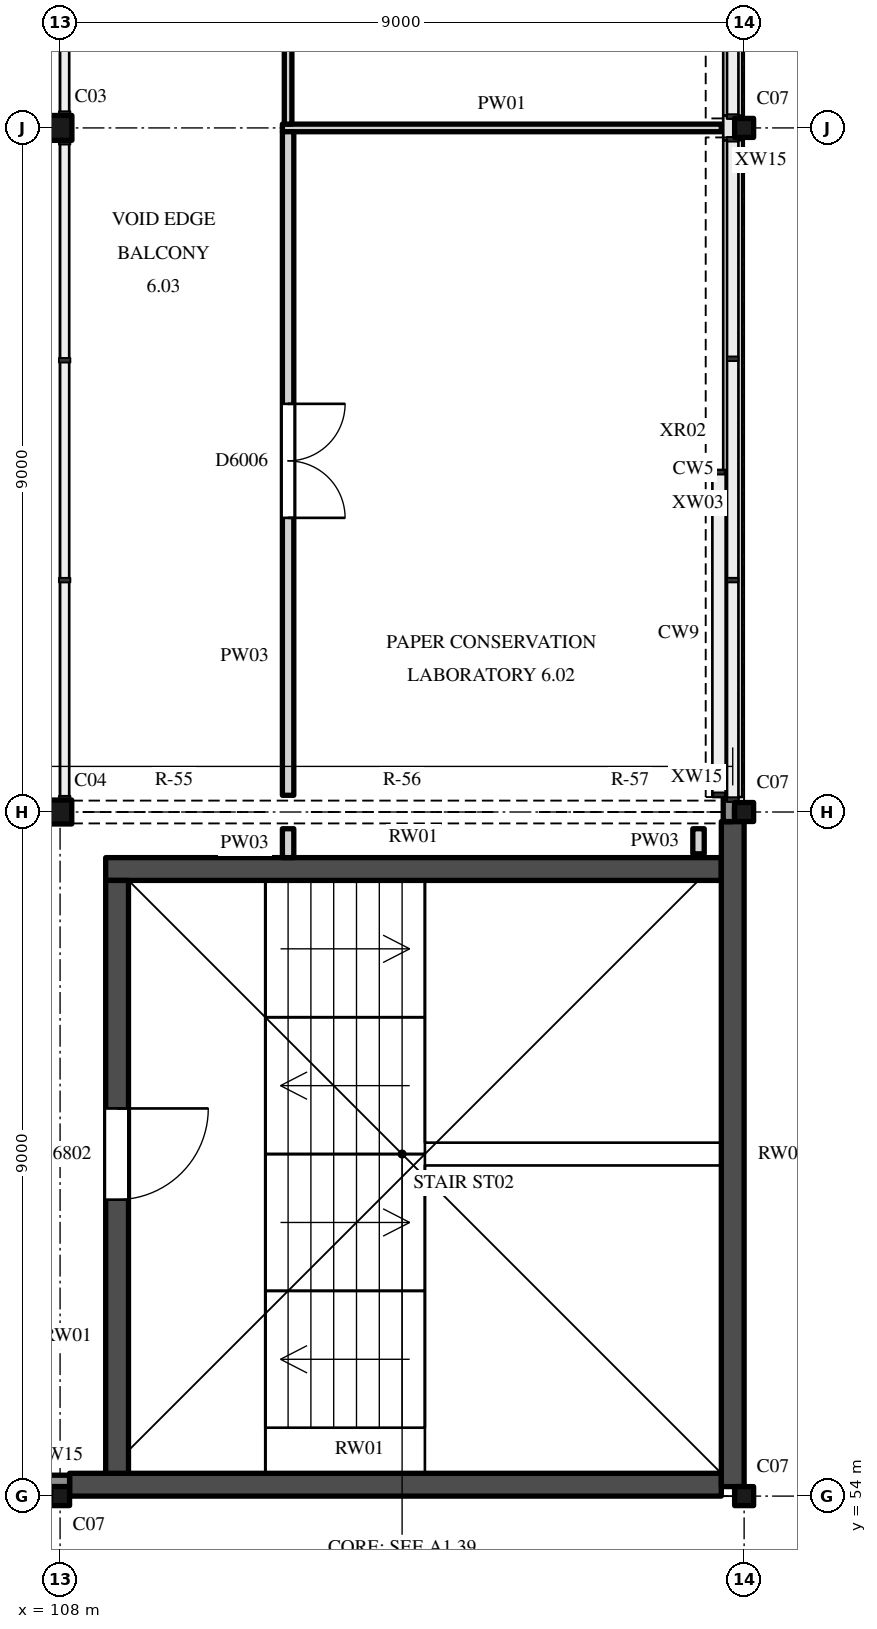
"""IFC4 building model, lengths in metres.
Left out: names, types, materials, properties, quantities, classifications, styles, units other than length and angle.
Written with IfcOpenShell. Run it as: python <this file> out.ifc"""

import sys

from ifc_helpers import new_model, si_unit, direction, frame, frame_2d, origin, origin_2d, place, context, subcontext, project, spatial, polyline, rectangle, hollow_rectangle, i_section, outline, extrude, element, fill, save


model = new_model("IFC4")
c1 = context("Model", 3, precision=1e-05, world=origin(), true_north=direction((0.0, 1.0)))
c2 = subcontext(c1, "Body", "Model", "MODEL_VIEW")
j1 = project(units=[si_unit("LENGTHUNIT", "METRE"), si_unit("PLANEANGLEUNIT", "RADIAN")], contexts=[c1])
p1 = place(None, origin())
s1 = spatial("IfcSite", under=j1, at=p1, CompositionType="ELEMENT")
p2 = place(p1, origin())
s2 = spatial("IfcBuilding", under=s1, at=p2, CompositionType="ELEMENT")
p3 = place(p2, frame((0.0, 0.0, 36.0)))
s3 = spatial("IfcBuildingStorey", under=s2, at=p3, CompositionType="ELEMENT", Elevation=36.0)
for number, where, z_axis, x_axis in (
    (1, (108.0, 54.0, 0.0), (0.0, 0.0, 1.0), (1.0, 0.0, 0.0)),
    (2, (117.0, 54.0, 0.0), (0.0, 0.0, 1.0), (1.0, 0.0, 0.0)),
):
    element("IfcColumn", number, at=place(p3, frame(where, z_axis=z_axis, x_axis=x_axis)), inside=s3, PredefinedType="COLUMN", context=c2, shape_type="SweptSolid", body=[
        extrude(hollow_rectangle(XDim=0.25, YDim=0.25, WallThickness=0.009, InnerFilletRadius=0.013, OuterFilletRadius=0.022, at=origin_2d()), origin(), (0.0, 0.0, 1.0), 8.0),
    ])
p4 = place(p3, frame((108.0, 63.0, 0.0), z_axis=(0.0, 0.0, 1.0), x_axis=(1.0, 0.0, 0.0)))
e3 = element("IfcColumn", 3, at=p4, inside=s3, PredefinedType="COLUMN", context=c2, shape_type="SweptSolid", body=[
    extrude(i_section(OverallWidth=0.307, OverallDepth=0.315, WebThickness=0.012, FlangeThickness=0.019, FilletRadius=0.017, at=origin_2d()), origin(), (0.0, 0.0, 1.0), 8.0),
])
p5 = place(p3, frame((117.0, 63.0, 0.0), z_axis=(0.0, 0.0, 1.0), x_axis=(1.0, 0.0, 0.0)))
e4 = element("IfcColumn", 4, at=p5, inside=s3, PredefinedType="COLUMN", context=c2, shape_type="SweptSolid", body=[
    extrude(hollow_rectangle(XDim=0.25, YDim=0.25, WallThickness=0.009, InnerFilletRadius=0.013, OuterFilletRadius=0.022, at=origin_2d()), origin(), (0.0, 0.0, 1.0), 8.0),
])
p6 = place(p3, frame((108.0, 72.0, 0.0), z_axis=(0.0, 0.0, 1.0), x_axis=(1.0, 0.0, 0.0)))
e5 = element("IfcColumn", 5, at=p6, inside=s3, PredefinedType="COLUMN", context=c2, shape_type="SweptSolid", body=[
    extrude(i_section(OverallWidth=0.311, OverallDepth=0.327, WebThickness=0.016, FlangeThickness=0.025, FilletRadius=0.017, at=origin_2d()), origin(), (0.0, 0.0, 1.0), 8.0),
])
p7 = place(p3, frame((117.0, 72.0, 0.0), z_axis=(0.0, 0.0, 1.0), x_axis=(1.0, 0.0, 0.0)))
e6 = element("IfcColumn", 6, at=p7, inside=s3, PredefinedType="COLUMN", context=c2, shape_type="SweptSolid", body=[
    extrude(hollow_rectangle(XDim=0.25, YDim=0.25, WallThickness=0.009, InnerFilletRadius=0.013, OuterFilletRadius=0.022, at=origin_2d()), origin(), (0.0, 0.0, 1.0), 8.0),
])
p8 = place(p3, frame((108.125, 54.15, 0.0), z_axis=(0.0, 0.0, 1.0), x_axis=(1.0, 0.0, 0.0)))
e7 = element("IfcWall", 7, at=p8, inside=s3, PredefinedType="SHEAR", context=c2, shape_type="SweptSolid", body=[
    extrude(rectangle(XDim=8.575, YDim=0.3, at=frame_2d((4.288, 0.0))), origin(), (0.0, 0.0, 1.0), 7.864),
])
p9 = place(p3, frame((108.6, 62.25, 0.0), z_axis=(0.0, 0.0, 1.0), x_axis=(1.0, 0.0, 0.0)))
e8 = element("IfcWall", 8, at=p9, inside=s3, PredefinedType="SHEAR", context=c2, shape_type="SweptSolid", body=[
    extrude(rectangle(XDim=8.1, YDim=0.3, at=frame_2d((4.05, 0.0))), origin(), (0.0, 0.0, 1.0), 14.344),
])
p10 = place(p3, frame((108.75, 54.3, 0.0), z_axis=(0.0, 0.0, 1.0), x_axis=(0.0, 1.0, 0.0)))
e9 = element("IfcWall", 9, at=p10, inside=s3, PredefinedType="SHEAR", context=c2, shape_type="SweptSolid", body=[
    extrude(outline(polyline([(0.0, 0.0), (7.8, 0.0), (7.8, 14.224), (0.0, 7.984), (0.0, 0.0)])), frame((0.0, 0.15, 0.0), z_axis=(0.0, -1.0, 0.0), x_axis=(1.0, 0.0, 0.0)), (0.0, 0.0, 1.0), 0.3),
])
p11 = place(p10, frame((3.6, 0.0, 0.0)))
e10 = element("IfcOpeningElement", 10, at=p11, cuts=e9, PredefinedType="OPENING", context=c2, shape_type="SweptSolid", body=[
    extrude(rectangle(XDim=1.2, YDim=2.1, at=frame_2d((0.6, 1.05))), frame((0.0, 0.16, 0.0), z_axis=(0.0, -1.0, 0.0), x_axis=(1.0, 0.0, 0.0)), (0.0, 0.0, 1.0), 0.32),
])
p12 = place(p3, frame((116.85, 54.125, 0.0), z_axis=(0.0, 0.0, 1.0), x_axis=(0.0, 1.0, 0.0)))
e11 = element("IfcWall", 11, at=p12, inside=s3, PredefinedType="SHEAR", context=c2, shape_type="SweptSolid", body=[
    extrude(outline(polyline([(0.0, 0.0), (8.75, 0.0), (8.75, 14.844), (0.0, 7.844), (0.0, 0.0)])), frame((0.0, 0.15, 0.0), z_axis=(0.0, -1.0, 0.0), x_axis=(1.0, 0.0, 0.0)), (0.0, 0.0, 1.0), 0.3),
])
for number, where, z_axis, x_axis in (
    (12, (116.85, 63.197, 0.0), (0.0, 0.0, 1.0), (0.0, 1.0, 0.0)),
    (13, (116.85, 72.161, 0.0), (0.0, 0.0, 1.0), (0.0, 1.0, 0.0)),
):
    element("IfcWall", number, at=place(p3, frame(where, z_axis=z_axis, x_axis=x_axis)), inside=s3, PredefinedType="SOLIDWALL", context=c2, shape_type="SweptSolid", body=[
        extrude(rectangle(XDim=8.642, YDim=0.25, at=frame_2d((4.321, 0.0))), origin(), (0.0, 0.0, 1.0), 1.1),
    ])
p13 = place(p3, frame((107.803, 54.2, 0.0), z_axis=(0.0, 0.0, 1.0), x_axis=(1.0, 0.0, 0.0)))
e14 = element("IfcWall", 14, at=p13, inside=s3, PredefinedType="SOLIDWALL", context=c2, shape_type="SweptSolid", body=[
    extrude(rectangle(XDim=0.322, YDim=0.15, at=frame_2d((0.161, 0.0))), origin(), (0.0, 0.0, 1.0), 7.864),
])
p14 = place(p3, frame((116.8, 62.875, 0.0), z_axis=(0.0, 0.0, 1.0), x_axis=(0.0, 1.0, 0.0)))
e15 = element("IfcWall", 15, at=p14, inside=s3, PredefinedType="SOLIDWALL", context=c2, shape_type="SweptSolid", body=[
    extrude(rectangle(XDim=0.322, YDim=0.15, at=frame_2d((0.161, 0.0))), origin(), (0.0, 0.0, 1.0), 14.844),
])
p15 = place(p3, frame((116.8, 71.839, 0.0), z_axis=(0.0, 0.0, 1.0), x_axis=(0.0, 1.0, 0.0)))
e16 = element("IfcWall", 16, at=p15, inside=s3, PredefinedType="SOLIDWALL", context=c2, shape_type="SweptSolid", body=[
    extrude(rectangle(XDim=0.322, YDim=0.15, at=frame_2d((0.161, 0.0))), origin(), (0.0, 0.0, 1.0), 1.1),
])
p16 = place(p3, frame((54.15, 63.0, 15.2), z_axis=(0.0, 0.0, 1.0), x_axis=(1.0, 0.0, 0.0)))
e17 = element("IfcWall", 17, at=p16, inside=s3, PredefinedType="SOLIDWALL", context=c2, shape_type="SweptSolid", body=[
    extrude(rectangle(XDim=62.7, YDim=0.3, at=frame_2d((31.35, 0.0))), origin(), (0.0, 0.0, 1.0), 0.9),
])
p17 = place(p16, frame((0.15, 0.0, 0.15)))
e18 = element("IfcOpeningElement", 18, at=p17, cuts=e17, PredefinedType="OPENING", context=c2, shape_type="SweptSolid", body=[
    extrude(rectangle(XDim=2.4, YDim=0.6, at=frame_2d((1.2, 0.3))), frame((0.0, 0.16, 0.0), z_axis=(0.0, -1.0, 0.0), x_axis=(1.0, 0.0, 0.0)), (0.0, 0.0, 1.0), 0.32),
])
p18 = place(p16, frame((3.15, 0.0, 0.15)))
e19 = element("IfcOpeningElement", 19, at=p18, cuts=e17, PredefinedType="OPENING", context=c2, shape_type="SweptSolid", body=[
    extrude(rectangle(XDim=2.4, YDim=0.6, at=frame_2d((1.2, 0.3))), frame((0.0, 0.16, 0.0), z_axis=(0.0, -1.0, 0.0), x_axis=(1.0, 0.0, 0.0)), (0.0, 0.0, 1.0), 0.32),
])
p19 = place(p16, frame((6.15, 0.0, 0.15)))
e20 = element("IfcOpeningElement", 20, at=p19, cuts=e17, PredefinedType="OPENING", context=c2, shape_type="SweptSolid", body=[
    extrude(rectangle(XDim=2.4, YDim=0.6, at=frame_2d((1.2, 0.3))), frame((0.0, 0.16, 0.0), z_axis=(0.0, -1.0, 0.0), x_axis=(1.0, 0.0, 0.0)), (0.0, 0.0, 1.0), 0.32),
])
p20 = place(p16, frame((9.15, 0.0, 0.15)))
e21 = element("IfcOpeningElement", 21, at=p20, cuts=e17, PredefinedType="OPENING", context=c2, shape_type="SweptSolid", body=[
    extrude(rectangle(XDim=2.4, YDim=0.6, at=frame_2d((1.2, 0.3))), frame((0.0, 0.16, 0.0), z_axis=(0.0, -1.0, 0.0), x_axis=(1.0, 0.0, 0.0)), (0.0, 0.0, 1.0), 0.32),
])
p21 = place(p16, frame((12.15, 0.0, 0.15)))
e22 = element("IfcOpeningElement", 22, at=p21, cuts=e17, PredefinedType="OPENING", context=c2, shape_type="SweptSolid", body=[
    extrude(rectangle(XDim=2.4, YDim=0.6, at=frame_2d((1.2, 0.3))), frame((0.0, 0.16, 0.0), z_axis=(0.0, -1.0, 0.0), x_axis=(1.0, 0.0, 0.0)), (0.0, 0.0, 1.0), 0.32),
])
p22 = place(p16, frame((15.15, 0.0, 0.15)))
e23 = element("IfcOpeningElement", 23, at=p22, cuts=e17, PredefinedType="OPENING", context=c2, shape_type="SweptSolid", body=[
    extrude(rectangle(XDim=2.4, YDim=0.6, at=frame_2d((1.2, 0.3))), frame((0.0, 0.16, 0.0), z_axis=(0.0, -1.0, 0.0), x_axis=(1.0, 0.0, 0.0)), (0.0, 0.0, 1.0), 0.32),
])
p23 = place(p16, frame((18.15, 0.0, 0.15)))
e24 = element("IfcOpeningElement", 24, at=p23, cuts=e17, PredefinedType="OPENING", context=c2, shape_type="SweptSolid", body=[
    extrude(rectangle(XDim=2.4, YDim=0.6, at=frame_2d((1.2, 0.3))), frame((0.0, 0.16, 0.0), z_axis=(0.0, -1.0, 0.0), x_axis=(1.0, 0.0, 0.0)), (0.0, 0.0, 1.0), 0.32),
])
p24 = place(p16, frame((21.15, 0.0, 0.15)))
e25 = element("IfcOpeningElement", 25, at=p24, cuts=e17, PredefinedType="OPENING", context=c2, shape_type="SweptSolid", body=[
    extrude(rectangle(XDim=2.4, YDim=0.6, at=frame_2d((1.2, 0.3))), frame((0.0, 0.16, 0.0), z_axis=(0.0, -1.0, 0.0), x_axis=(1.0, 0.0, 0.0)), (0.0, 0.0, 1.0), 0.32),
])
p25 = place(p16, frame((24.15, 0.0, 0.15)))
e26 = element("IfcOpeningElement", 26, at=p25, cuts=e17, PredefinedType="OPENING", context=c2, shape_type="SweptSolid", body=[
    extrude(rectangle(XDim=2.4, YDim=0.6, at=frame_2d((1.2, 0.3))), frame((0.0, 0.16, 0.0), z_axis=(0.0, -1.0, 0.0), x_axis=(1.0, 0.0, 0.0)), (0.0, 0.0, 1.0), 0.32),
])
p26 = place(p16, frame((27.15, 0.0, 0.15)))
e27 = element("IfcOpeningElement", 27, at=p26, cuts=e17, PredefinedType="OPENING", context=c2, shape_type="SweptSolid", body=[
    extrude(rectangle(XDim=2.4, YDim=0.6, at=frame_2d((1.2, 0.3))), frame((0.0, 0.16, 0.0), z_axis=(0.0, -1.0, 0.0), x_axis=(1.0, 0.0, 0.0)), (0.0, 0.0, 1.0), 0.32),
])
p27 = place(p16, frame((30.15, 0.0, 0.15)))
e28 = element("IfcOpeningElement", 28, at=p27, cuts=e17, PredefinedType="OPENING", context=c2, shape_type="SweptSolid", body=[
    extrude(rectangle(XDim=2.4, YDim=0.6, at=frame_2d((1.2, 0.3))), frame((0.0, 0.16, 0.0), z_axis=(0.0, -1.0, 0.0), x_axis=(1.0, 0.0, 0.0)), (0.0, 0.0, 1.0), 0.32),
])
p28 = place(p16, frame((33.15, 0.0, 0.15)))
e29 = element("IfcOpeningElement", 29, at=p28, cuts=e17, PredefinedType="OPENING", context=c2, shape_type="SweptSolid", body=[
    extrude(rectangle(XDim=2.4, YDim=0.6, at=frame_2d((1.2, 0.3))), frame((0.0, 0.16, 0.0), z_axis=(0.0, -1.0, 0.0), x_axis=(1.0, 0.0, 0.0)), (0.0, 0.0, 1.0), 0.32),
])
p29 = place(p16, frame((36.15, 0.0, 0.15)))
e30 = element("IfcOpeningElement", 30, at=p29, cuts=e17, PredefinedType="OPENING", context=c2, shape_type="SweptSolid", body=[
    extrude(rectangle(XDim=2.4, YDim=0.6, at=frame_2d((1.2, 0.3))), frame((0.0, 0.16, 0.0), z_axis=(0.0, -1.0, 0.0), x_axis=(1.0, 0.0, 0.0)), (0.0, 0.0, 1.0), 0.32),
])
p30 = place(p16, frame((39.15, 0.0, 0.15)))
e31 = element("IfcOpeningElement", 31, at=p30, cuts=e17, PredefinedType="OPENING", context=c2, shape_type="SweptSolid", body=[
    extrude(rectangle(XDim=2.4, YDim=0.6, at=frame_2d((1.2, 0.3))), frame((0.0, 0.16, 0.0), z_axis=(0.0, -1.0, 0.0), x_axis=(1.0, 0.0, 0.0)), (0.0, 0.0, 1.0), 0.32),
])
p31 = place(p16, frame((42.15, 0.0, 0.15)))
e32 = element("IfcOpeningElement", 32, at=p31, cuts=e17, PredefinedType="OPENING", context=c2, shape_type="SweptSolid", body=[
    extrude(rectangle(XDim=2.4, YDim=0.6, at=frame_2d((1.2, 0.3))), frame((0.0, 0.16, 0.0), z_axis=(0.0, -1.0, 0.0), x_axis=(1.0, 0.0, 0.0)), (0.0, 0.0, 1.0), 0.32),
])
p32 = place(p16, frame((45.15, 0.0, 0.15)))
e33 = element("IfcOpeningElement", 33, at=p32, cuts=e17, PredefinedType="OPENING", context=c2, shape_type="SweptSolid", body=[
    extrude(rectangle(XDim=2.4, YDim=0.6, at=frame_2d((1.2, 0.3))), frame((0.0, 0.16, 0.0), z_axis=(0.0, -1.0, 0.0), x_axis=(1.0, 0.0, 0.0)), (0.0, 0.0, 1.0), 0.32),
])
p33 = place(p16, frame((48.15, 0.0, 0.15)))
e34 = element("IfcOpeningElement", 34, at=p33, cuts=e17, PredefinedType="OPENING", context=c2, shape_type="SweptSolid", body=[
    extrude(rectangle(XDim=2.4, YDim=0.6, at=frame_2d((1.2, 0.3))), frame((0.0, 0.16, 0.0), z_axis=(0.0, -1.0, 0.0), x_axis=(1.0, 0.0, 0.0)), (0.0, 0.0, 1.0), 0.32),
])
p34 = place(p16, frame((51.15, 0.0, 0.15)))
e35 = element("IfcOpeningElement", 35, at=p34, cuts=e17, PredefinedType="OPENING", context=c2, shape_type="SweptSolid", body=[
    extrude(rectangle(XDim=2.4, YDim=0.6, at=frame_2d((1.2, 0.3))), frame((0.0, 0.16, 0.0), z_axis=(0.0, -1.0, 0.0), x_axis=(1.0, 0.0, 0.0)), (0.0, 0.0, 1.0), 0.32),
])
p35 = place(p16, frame((54.15, 0.0, 0.15)))
e36 = element("IfcOpeningElement", 36, at=p35, cuts=e17, PredefinedType="OPENING", context=c2, shape_type="SweptSolid", body=[
    extrude(rectangle(XDim=2.4, YDim=0.6, at=frame_2d((1.2, 0.3))), frame((0.0, 0.16, 0.0), z_axis=(0.0, -1.0, 0.0), x_axis=(1.0, 0.0, 0.0)), (0.0, 0.0, 1.0), 0.32),
])
p36 = place(p16, frame((57.15, 0.0, 0.15)))
e37 = element("IfcOpeningElement", 37, at=p36, cuts=e17, PredefinedType="OPENING", context=c2, shape_type="SweptSolid", body=[
    extrude(rectangle(XDim=2.4, YDim=0.6, at=frame_2d((1.2, 0.3))), frame((0.0, 0.16, 0.0), z_axis=(0.0, -1.0, 0.0), x_axis=(1.0, 0.0, 0.0)), (0.0, 0.0, 1.0), 0.32),
])
p37 = place(p16, frame((60.15, 0.0, 0.15)))
e38 = element("IfcOpeningElement", 38, at=p37, cuts=e17, PredefinedType="OPENING", context=c2, shape_type="SweptSolid", body=[
    extrude(rectangle(XDim=2.4, YDim=0.6, at=frame_2d((1.2, 0.3))), frame((0.0, 0.16, 0.0), z_axis=(0.0, -1.0, 0.0), x_axis=(1.0, 0.0, 0.0)), (0.0, 0.0, 1.0), 0.32),
])
p38 = place(p3, frame((116.669, 63.197, 11.0), z_axis=(0.0, 0.0, 1.0), x_axis=(0.0, 1.0, 0.0)))
e39 = element("IfcWall", 39, at=p38, inside=s3, PredefinedType="SOLIDWALL", context=c2, shape_type="SweptSolid", body=[
    extrude(outline(polyline([(0.0, 0.0), (4.303, 0.0), (4.303, 0.344), (0.0, 3.786), (0.0, 0.0)])), frame((0.0, 0.175, 0.0), z_axis=(0.0, -1.0, 0.0), x_axis=(1.0, 0.0, 0.0)), (0.0, 0.0, 1.0), 0.35),
])
p39 = place(p3, frame((116.669, 67.5, 7.8), z_axis=(0.0, 0.0, 1.0), x_axis=(0.0, 1.0, 0.0)))
e40 = element("IfcWall", 40, at=p39, inside=s3, PredefinedType="SOLIDWALL", context=c2, shape_type="SweptSolid", body=[
    extrude(outline(polyline([(0.0, 0.0), (4.375, 0.0), (4.375, 0.044), (0.0, 3.544), (0.0, 0.0)])), frame((0.0, 0.175, 0.0), z_axis=(0.0, -1.0, 0.0), x_axis=(1.0, 0.0, 0.0)), (0.0, 0.0, 1.0), 0.35),
])
p40 = place(p3, frame((116.669, 72.125, 7.8), z_axis=(0.0, 0.0, 1.0), x_axis=(0.0, 1.0, 0.0)))
e41 = element("IfcWall", 41, at=p40, inside=s3, PredefinedType="SOLIDWALL", context=c2, shape_type="SweptSolid", body=[
    extrude(outline(polyline([(0.0, 0.0), (4.375, 0.0), (4.375, 3.544), (0.0, 0.044), (0.0, 0.0)])), frame((0.0, 0.175, 0.0), z_axis=(0.0, -1.0, 0.0), x_axis=(1.0, 0.0, 0.0)), (0.0, 0.0, 1.0), 0.35),
])
p41 = place(p3, frame((110.925, 72.0, 0.0), z_axis=(0.0, 0.0, 1.0), x_axis=(1.0, 0.0, 0.0)))
e42 = element("IfcWall", 42, at=p41, inside=s3, PredefinedType="PARTITIONING", context=c2, shape_type="SweptSolid", body=[
    extrude(rectangle(XDim=5.775, YDim=0.1, at=frame_2d((2.887, 0.0))), origin(), (0.0, 0.0, 1.0), 7.366),
])
p42 = place(p3, frame((111.0, 62.4, 0.0), z_axis=(0.0, 0.0, 1.0), x_axis=(0.0, 1.0, 0.0)))
e43 = element("IfcWall", 43, at=p42, inside=s3, PredefinedType="PARTITIONING", context=c2, shape_type="SweptSolid", body=[
    extrude(rectangle(XDim=0.38, YDim=0.15, at=frame_2d((0.19, 0.0))), origin(), (0.0, 0.0, 1.0), 7.744),
])
p43 = place(p3, frame((111.0, 63.22, 0.0), z_axis=(0.0, 0.0, 1.0), x_axis=(0.0, 1.0, 0.0)))
e44 = element("IfcWall", 44, at=p43, inside=s3, PredefinedType="PARTITIONING", context=c2, shape_type="SweptSolid", body=[
    extrude(rectangle(XDim=8.73, YDim=0.15, at=frame_2d((4.365, 0.0))), origin(), (0.0, 0.0, 1.0), 7.744),
])
p44 = place(p43, frame((3.65, 0.0, 0.0)))
e45 = element("IfcOpeningElement", 45, at=p44, cuts=e44, PredefinedType="OPENING", context=c2, shape_type="SweptSolid", body=[
    extrude(rectangle(XDim=1.5, YDim=2.1, at=frame_2d((0.75, 1.05))), frame((0.0, 0.085, 0.0), z_axis=(0.0, -1.0, 0.0), x_axis=(1.0, 0.0, 0.0)), (0.0, 0.0, 1.0), 0.17),
])
p45 = place(p3, frame((111.0, 72.05, 0.0), z_axis=(0.0, 0.0, 1.0), x_axis=(0.0, 1.0, 0.0)))
e46 = element("IfcWall", 46, at=p45, inside=s3, PredefinedType="PARTITIONING", context=c2, shape_type="SweptSolid", body=[
    extrude(rectangle(XDim=8.73, YDim=0.1, at=frame_2d((4.365, 0.0))), origin(), (0.0, 0.0, 1.0), 7.744),
])
p46 = place(p45, frame((3.75, 0.0, 0.0)))
e47 = element("IfcOpeningElement", 47, at=p46, cuts=e46, PredefinedType="OPENING", context=c2, shape_type="SweptSolid", body=[
    extrude(rectangle(XDim=1.2, YDim=2.4, at=frame_2d((0.6, 1.2))), frame((0.0, 0.06, 0.0), z_axis=(0.0, -1.0, 0.0), x_axis=(1.0, 0.0, 0.0)), (0.0, 0.0, 1.0), 0.12),
])
p47 = place(p3, frame((116.4, 62.45, 0.0), z_axis=(0.0, 0.0, 1.0), x_axis=(0.0, 1.0, 0.0)))
e48 = element("IfcWall", 48, at=p47, inside=s3, PredefinedType="PARTITIONING", context=c2, shape_type="SweptSolid", body=[
    extrude(rectangle(XDim=0.33, YDim=0.15, at=frame_2d((0.165, 0.0))), origin(), (0.0, 0.0, 1.0), 7.744),
])
p48 = place(p11, origin())
e49 = element("IfcDoor", 49, at=p48, inside=s3, OperationType="SINGLE_SWING_RIGHT", PredefinedType="DOOR", context=c2, shape_type="SweptSolid", body=[
    extrude(rectangle(XDim=1.2, YDim=2.1, at=frame_2d((0.6, 1.05))), frame((0.0, 0.025, 0.0), z_axis=(0.0, -1.0, 0.0), x_axis=(1.0, 0.0, 0.0)), (0.0, 0.0, 1.0), 0.05),
])
fill(e10, e49)
p49 = place(p35, origin())
e50 = element("IfcWindow", 50, at=p49, inside=s3, PartitioningType="SINGLE_PANEL", PredefinedType="SKYLIGHT", context=c2, shape_type="SweptSolid", body=[
    extrude(rectangle(XDim=2.4, YDim=0.6, at=frame_2d((1.2, 0.3))), frame((0.0, 0.03, 0.0), z_axis=(0.0, -1.0, 0.0), x_axis=(1.0, 0.0, 0.0)), (0.0, 0.0, 1.0), 0.06),
])
fill(e36, e50)
p50 = place(p36, origin())
e51 = element("IfcWindow", 51, at=p50, inside=s3, PartitioningType="SINGLE_PANEL", PredefinedType="SKYLIGHT", context=c2, shape_type="SweptSolid", body=[
    extrude(rectangle(XDim=2.4, YDim=0.6, at=frame_2d((1.2, 0.3))), frame((0.0, 0.03, 0.0), z_axis=(0.0, -1.0, 0.0), x_axis=(1.0, 0.0, 0.0)), (0.0, 0.0, 1.0), 0.06),
])
fill(e37, e51)
p51 = place(p37, origin())
e52 = element("IfcWindow", 52, at=p51, inside=s3, PartitioningType="SINGLE_PANEL", PredefinedType="SKYLIGHT", context=c2, shape_type="SweptSolid", body=[
    extrude(rectangle(XDim=2.4, YDim=0.6, at=frame_2d((1.2, 0.3))), frame((0.0, 0.03, 0.0), z_axis=(0.0, -1.0, 0.0), x_axis=(1.0, 0.0, 0.0)), (0.0, 0.0, 1.0), 0.06),
])
fill(e38, e52)
p52 = place(p44, origin())
e53 = element("IfcDoor", 53, at=p52, inside=s3, OperationType="DOUBLE_DOOR_SINGLE_SWING", PredefinedType="DOOR", context=c2, shape_type="SweptSolid", body=[
    extrude(rectangle(XDim=1.5, YDim=2.1, at=frame_2d((0.75, 1.05))), frame((0.0, 0.025, 0.0), z_axis=(0.0, -1.0, 0.0), x_axis=(1.0, 0.0, 0.0)), (0.0, 0.0, 1.0), 0.05),
])
fill(e45, e53)
save(model, sys.argv[1])
